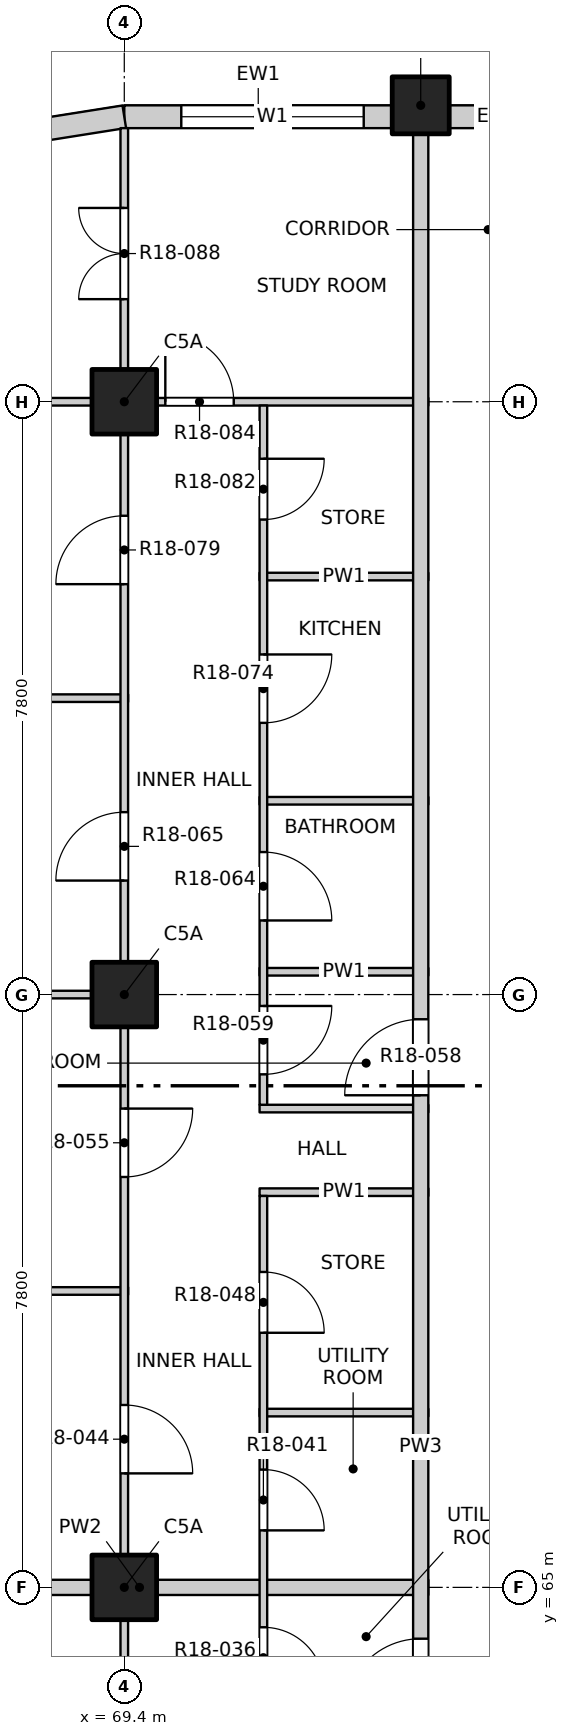
"""IFC4 building model, lengths in metres.
Left out: names, types, materials, properties, quantities, classifications, styles, units other than length and angle.
Written with IfcOpenShell. Run it as: python <this file> out.ifc"""

import sys

from ifc_helpers import new_model, si_unit, direction, frame, frame_2d, origin, origin_2d, place, context, subcontext, project, spatial, rectangle, extrude, element, fill, save


model = new_model("IFC4")
c1 = context("Model", 3, precision=1e-05, world=origin(), true_north=direction((0.0, 1.0)))
c2 = subcontext(c1, "Body", "Model", "MODEL_VIEW")
j1 = project(units=[si_unit("LENGTHUNIT", "METRE"), si_unit("PLANEANGLEUNIT", "RADIAN")], contexts=[c1])
p1 = place(None, origin())
s1 = spatial("IfcSite", under=j1, at=p1, CompositionType="ELEMENT")
p2 = place(p1, origin())
s2 = spatial("IfcBuilding", under=s1, at=p2, CompositionType="ELEMENT")
p3 = place(p2, frame((0.0, 0.0, 189.4)))
s3 = spatial("IfcBuildingStorey", under=s2, at=p3, CompositionType="ELEMENT", Elevation=189.4)
p4 = place(p3, frame((73.3, 84.5, -0.25), z_axis=(0.0, 0.0, 1.0), x_axis=(1.0, 0.0, 0.0)))
e1 = element("IfcColumn", 1, at=p4, inside=s3, PredefinedType="COLUMN", context=c2, shape_type="SweptSolid", body=[
    extrude(rectangle(XDim=0.75, YDim=0.75, at=origin_2d()), origin(), (0.0, 0.0, 1.0), 3.35),
])
for number, where, z_axis, x_axis in (
    (2, (69.4, 65.0, -0.25), (0.0, 0.0, 1.0), (1.0, 0.0, 0.0)),
    (3, (69.4, 72.8, -0.25), (0.0, 0.0, 1.0), (1.0, 0.0, 0.0)),
    (4, (69.4, 80.6, -0.25), (0.0, 0.0, 1.0), (1.0, 0.0, 0.0)),
):
    element("IfcColumn", number, at=place(p3, frame(where, z_axis=z_axis, x_axis=x_axis)), inside=s3, PredefinedType="COLUMN", context=c2, shape_type="SweptSolid", body=[
        extrude(rectangle(XDim=0.85, YDim=0.85, at=origin_2d()), origin(), (0.0, 0.0, 1.0), 3.35),
    ])
p5 = place(p3, frame((69.4, 84.35, 0.0), z_axis=(0.0, 0.0, 1.0), x_axis=(1.0, 0.0, 0.0)))
e5 = element("IfcWall", 5, at=p5, inside=s3, PredefinedType="SOLIDWALL", context=c2, shape_type="SweptSolid", body=[
    extrude(rectangle(XDim=3.525, YDim=0.3, at=frame_2d((1.763, 0.0))), origin(), (0.0, 0.0, 1.0), 3.1),
])
p6 = place(p5, frame((0.75, 0.0, 0.9)))
e6 = element("IfcOpeningElement", 6, at=p6, cuts=e5, PredefinedType="OPENING", context=c2, shape_type="SweptSolid", body=[
    extrude(rectangle(XDim=2.4, YDim=1.8, at=frame_2d((1.2, 0.9))), frame((0.0, 0.16, 0.0), z_axis=(0.0, -1.0, 0.0), x_axis=(1.0, 0.0, 0.0)), (0.0, 0.0, 1.0), 0.32),
])
p7 = place(p3, frame((73.675, 84.35, 0.0), z_axis=(0.0, 0.0, 1.0), x_axis=(1.0, 0.0, 0.0)))
e7 = element("IfcWall", 7, at=p7, inside=s3, PredefinedType="SOLIDWALL", context=c2, shape_type="SweptSolid", body=[
    extrude(rectangle(XDim=1.3, YDim=0.3, at=frame_2d((0.65, 0.0))), origin(), (0.0, 0.0, 1.0), 3.1),
])
p8 = place(p3, frame((69.4, 84.35, 0.0), z_axis=(0.0, 0.0, 1.0), x_axis=(-0.987678452879, -0.156496880861, 0.0)))
e8 = element("IfcWall", 8, at=p8, inside=s3, PredefinedType="SOLIDWALL", context=c2, shape_type="SweptSolid", body=[
    extrude(rectangle(XDim=1.173, YDim=0.3, at=frame_2d((0.586, 0.0))), origin(), (0.0, 0.0, 1.0), 3.1),
])
p9 = place(p3, frame((65.8, 65.0, 0.0), z_axis=(0.0, 0.0, 1.0), x_axis=(1.0, 0.0, 0.0)))
e9 = element("IfcWall", 9, at=p9, inside=s3, PredefinedType="PARTITIONING", context=c2, shape_type="SweptSolid", body=[
    extrude(rectangle(XDim=7.6, YDim=0.2, at=frame_2d((3.8, 0.0))), origin(), (0.0, 0.0, 1.0), 3.1),
])
p10 = place(p3, frame((71.18, 67.3, 0.0), z_axis=(0.0, 0.0, 1.0), x_axis=(1.0, 0.0, 0.0)))
e10 = element("IfcWall", 10, at=p10, inside=s3, PredefinedType="PARTITIONING", context=c2, shape_type="SweptSolid", body=[
    extrude(rectangle(XDim=2.22, YDim=0.1, at=frame_2d((1.11, 0.0))), origin(), (0.0, 0.0, 1.0), 3.1),
])
p11 = place(p3, frame((65.8, 68.9, 0.0), z_axis=(0.0, 0.0, 1.0), x_axis=(1.0, 0.0, 0.0)))
e11 = element("IfcWall", 11, at=p11, inside=s3, PredefinedType="PARTITIONING", context=c2, shape_type="SweptSolid", body=[
    extrude(rectangle(XDim=3.65, YDim=0.1, at=frame_2d((1.825, 0.0))), origin(), (0.0, 0.0, 1.0), 3.1),
])
for number, where, z_axis, x_axis in (
    (12, (71.18, 70.2, 0.0), (0.0, 0.0, 1.0), (1.0, 0.0, 0.0)),
    (13, (71.18, 71.3, 0.0), (0.0, 0.0, 1.0), (1.0, 0.0, 0.0)),
):
    element("IfcWall", number, at=place(p3, frame(where, z_axis=z_axis, x_axis=x_axis)), inside=s3, PredefinedType="PARTITIONING", context=c2, shape_type="SweptSolid", body=[
        extrude(rectangle(XDim=2.22, YDim=0.1, at=frame_2d((1.11, 0.0))), origin(), (0.0, 0.0, 1.0), 3.1),
    ])
p12 = place(p3, frame((65.8, 72.8, 0.0), z_axis=(0.0, 0.0, 1.0), x_axis=(1.0, 0.0, 0.0)))
e14 = element("IfcWall", 14, at=p12, inside=s3, PredefinedType="PARTITIONING", context=c2, shape_type="SweptSolid", body=[
    extrude(rectangle(XDim=3.65, YDim=0.1, at=frame_2d((1.825, 0.0))), origin(), (0.0, 0.0, 1.0), 3.1),
])
for number, where, z_axis, x_axis in (
    (15, (71.18, 73.1, 0.0), (0.0, 0.0, 1.0), (1.0, 0.0, 0.0)),
    (16, (71.18, 75.35, 0.0), (0.0, 0.0, 1.0), (1.0, 0.0, 0.0)),
):
    element("IfcWall", number, at=place(p3, frame(where, z_axis=z_axis, x_axis=x_axis)), inside=s3, PredefinedType="PARTITIONING", context=c2, shape_type="SweptSolid", body=[
        extrude(rectangle(XDim=2.22, YDim=0.1, at=frame_2d((1.11, 0.0))), origin(), (0.0, 0.0, 1.0), 3.1),
    ])
p13 = place(p3, frame((65.8, 76.7, 0.0), z_axis=(0.0, 0.0, 1.0), x_axis=(1.0, 0.0, 0.0)))
e17 = element("IfcWall", 17, at=p13, inside=s3, PredefinedType="PARTITIONING", context=c2, shape_type="SweptSolid", body=[
    extrude(rectangle(XDim=3.65, YDim=0.1, at=frame_2d((1.825, 0.0))), origin(), (0.0, 0.0, 1.0), 3.1),
])
p14 = place(p3, frame((71.18, 78.3, 0.0), z_axis=(0.0, 0.0, 1.0), x_axis=(1.0, 0.0, 0.0)))
e18 = element("IfcWall", 18, at=p14, inside=s3, PredefinedType="PARTITIONING", context=c2, shape_type="SweptSolid", body=[
    extrude(rectangle(XDim=2.22, YDim=0.1, at=frame_2d((1.11, 0.0))), origin(), (0.0, 0.0, 1.0), 3.1),
])
p15 = place(p3, frame((65.8, 80.6, 0.0), z_axis=(0.0, 0.0, 1.0), x_axis=(1.0, 0.0, 0.0)))
e19 = element("IfcWall", 19, at=p15, inside=s3, PredefinedType="PARTITIONING", context=c2, shape_type="SweptSolid", body=[
    extrude(rectangle(XDim=7.6, YDim=0.1, at=frame_2d((3.8, 0.0))), origin(), (0.0, 0.0, 1.0), 3.1),
])
p16 = place(p15, frame((4.14, 0.0, 0.0)))
e20 = element("IfcOpeningElement", 20, at=p16, cuts=e19, PredefinedType="OPENING", context=c2, shape_type="SweptSolid", body=[
    extrude(rectangle(XDim=0.9, YDim=2.1, at=frame_2d((0.45, 1.05))), frame((0.0, 0.06, 0.0), z_axis=(0.0, -1.0, 0.0), x_axis=(1.0, 0.0, 0.0)), (0.0, 0.0, 1.0), 0.12),
])
p17 = place(p3, frame((69.4, 45.8, 0.0), z_axis=(0.0, 0.0, 1.0), x_axis=(0.0, 1.0, 0.0)))
e21 = element("IfcWall", 21, at=p17, inside=s3, PredefinedType="PARTITIONING", context=c2, shape_type="SweptSolid", body=[
    extrude(rectangle(XDim=38.4, YDim=0.1, at=frame_2d((19.2, 0.0))), origin(), (0.0, 0.0, 1.0), 3.1),
])
p18 = place(p17, frame((1.05, 0.0, 0.0)))
e22 = element("IfcOpeningElement", 22, at=p18, cuts=e21, PredefinedType="OPENING", context=c2, shape_type="SweptSolid", body=[
    extrude(rectangle(XDim=1.2, YDim=2.1, at=frame_2d((0.6, 1.05))), frame((0.0, 0.06, 0.0), z_axis=(0.0, -1.0, 0.0), x_axis=(1.0, 0.0, 0.0)), (0.0, 0.0, 1.0), 0.12),
])
p19 = place(p17, frame((5.1, 0.0, 0.0)))
e23 = element("IfcOpeningElement", 23, at=p19, cuts=e21, PredefinedType="OPENING", context=c2, shape_type="SweptSolid", body=[
    extrude(rectangle(XDim=0.9, YDim=2.1, at=frame_2d((0.45, 1.05))), frame((0.0, 0.06, 0.0), z_axis=(0.0, -1.0, 0.0), x_axis=(1.0, 0.0, 0.0)), (0.0, 0.0, 1.0), 0.12),
])
p20 = place(p17, frame((9.0, 0.0, 0.0)))
e24 = element("IfcOpeningElement", 24, at=p20, cuts=e21, PredefinedType="OPENING", context=c2, shape_type="SweptSolid", body=[
    extrude(rectangle(XDim=0.9, YDim=2.1, at=frame_2d((0.45, 1.05))), frame((0.0, 0.06, 0.0), z_axis=(0.0, -1.0, 0.0), x_axis=(1.0, 0.0, 0.0)), (0.0, 0.0, 1.0), 0.12),
])
p21 = place(p17, frame((12.9, 0.0, 0.0)))
e25 = element("IfcOpeningElement", 25, at=p21, cuts=e21, PredefinedType="OPENING", context=c2, shape_type="SweptSolid", body=[
    extrude(rectangle(XDim=0.9, YDim=2.1, at=frame_2d((0.45, 1.05))), frame((0.0, 0.06, 0.0), z_axis=(0.0, -1.0, 0.0), x_axis=(1.0, 0.0, 0.0)), (0.0, 0.0, 1.0), 0.12),
])
p22 = place(p17, frame((16.8, 0.0, 0.0)))
e26 = element("IfcOpeningElement", 26, at=p22, cuts=e21, PredefinedType="OPENING", context=c2, shape_type="SweptSolid", body=[
    extrude(rectangle(XDim=0.9, YDim=2.1, at=frame_2d((0.45, 1.05))), frame((0.0, 0.06, 0.0), z_axis=(0.0, -1.0, 0.0), x_axis=(1.0, 0.0, 0.0)), (0.0, 0.0, 1.0), 0.12),
])
p23 = place(p17, frame((20.7, 0.0, 0.0)))
e27 = element("IfcOpeningElement", 27, at=p23, cuts=e21, PredefinedType="OPENING", context=c2, shape_type="SweptSolid", body=[
    extrude(rectangle(XDim=0.9, YDim=2.1, at=frame_2d((0.45, 1.05))), frame((0.0, 0.06, 0.0), z_axis=(0.0, -1.0, 0.0), x_axis=(1.0, 0.0, 0.0)), (0.0, 0.0, 1.0), 0.12),
])
p24 = place(p17, frame((24.6, 0.0, 0.0)))
e28 = element("IfcOpeningElement", 28, at=p24, cuts=e21, PredefinedType="OPENING", context=c2, shape_type="SweptSolid", body=[
    extrude(rectangle(XDim=0.9, YDim=2.1, at=frame_2d((0.45, 1.05))), frame((0.0, 0.06, 0.0), z_axis=(0.0, -1.0, 0.0), x_axis=(1.0, 0.0, 0.0)), (0.0, 0.0, 1.0), 0.12),
])
p25 = place(p17, frame((28.5, 0.0, 0.0)))
e29 = element("IfcOpeningElement", 29, at=p25, cuts=e21, PredefinedType="OPENING", context=c2, shape_type="SweptSolid", body=[
    extrude(rectangle(XDim=0.9, YDim=2.1, at=frame_2d((0.45, 1.05))), frame((0.0, 0.06, 0.0), z_axis=(0.0, -1.0, 0.0), x_axis=(1.0, 0.0, 0.0)), (0.0, 0.0, 1.0), 0.12),
])
p26 = place(p17, frame((32.4, 0.0, 0.0)))
e30 = element("IfcOpeningElement", 30, at=p26, cuts=e21, PredefinedType="OPENING", context=c2, shape_type="SweptSolid", body=[
    extrude(rectangle(XDim=0.9, YDim=2.1, at=frame_2d((0.45, 1.05))), frame((0.0, 0.06, 0.0), z_axis=(0.0, -1.0, 0.0), x_axis=(1.0, 0.0, 0.0)), (0.0, 0.0, 1.0), 0.12),
])
p27 = place(p17, frame((36.15, 0.0, 0.0)))
e31 = element("IfcOpeningElement", 31, at=p27, cuts=e21, PredefinedType="OPENING", context=c2, shape_type="SweptSolid", body=[
    extrude(rectangle(XDim=1.2, YDim=2.1, at=frame_2d((0.6, 1.05))), frame((0.0, 0.06, 0.0), z_axis=(0.0, -1.0, 0.0), x_axis=(1.0, 0.0, 0.0)), (0.0, 0.0, 1.0), 0.12),
])
p28 = place(p3, frame((71.23, 63.2, 0.0), z_axis=(0.0, 0.0, 1.0), x_axis=(0.0, 1.0, 0.0)))
e32 = element("IfcWall", 32, at=p28, inside=s3, PredefinedType="PARTITIONING", context=c2, shape_type="SweptSolid", body=[
    extrude(rectangle(XDim=6.95, YDim=0.1, at=frame_2d((3.475, 0.0))), origin(), (0.0, 0.0, 1.0), 3.1),
])
p29 = place(p28, frame((0.475, 0.0, 0.0)))
e33 = element("IfcOpeningElement", 33, at=p29, cuts=e32, PredefinedType="OPENING", context=c2, shape_type="SweptSolid", body=[
    extrude(rectangle(XDim=0.8, YDim=2.1, at=frame_2d((0.4, 1.05))), frame((0.0, 0.06, 0.0), z_axis=(0.0, -1.0, 0.0), x_axis=(1.0, 0.0, 0.0)), (0.0, 0.0, 1.0), 0.12),
])
p30 = place(p28, frame((2.55, 0.0, 0.0)))
e34 = element("IfcOpeningElement", 34, at=p30, cuts=e32, PredefinedType="OPENING", context=c2, shape_type="SweptSolid", body=[
    extrude(rectangle(XDim=0.8, YDim=2.1, at=frame_2d((0.4, 1.05))), frame((0.0, 0.06, 0.0), z_axis=(0.0, -1.0, 0.0), x_axis=(1.0, 0.0, 0.0)), (0.0, 0.0, 1.0), 0.12),
])
p31 = place(p28, frame((5.15, 0.0, 0.0)))
e35 = element("IfcOpeningElement", 35, at=p31, cuts=e32, PredefinedType="OPENING", context=c2, shape_type="SweptSolid", body=[
    extrude(rectangle(XDim=0.8, YDim=2.1, at=frame_2d((0.4, 1.05))), frame((0.0, 0.06, 0.0), z_axis=(0.0, -1.0, 0.0), x_axis=(1.0, 0.0, 0.0)), (0.0, 0.0, 1.0), 0.12),
])
p32 = place(p3, frame((71.23, 71.35, 0.0), z_axis=(0.0, 0.0, 1.0), x_axis=(0.0, 1.0, 0.0)))
e36 = element("IfcWall", 36, at=p32, inside=s3, PredefinedType="PARTITIONING", context=c2, shape_type="SweptSolid", body=[
    extrude(rectangle(XDim=9.2, YDim=0.1, at=frame_2d((4.6, 0.0))), origin(), (0.0, 0.0, 1.0), 3.1),
])
p33 = place(p32, frame((0.4, 0.0, 0.0)))
e37 = element("IfcOpeningElement", 37, at=p33, cuts=e36, PredefinedType="OPENING", context=c2, shape_type="SweptSolid", body=[
    extrude(rectangle(XDim=0.9, YDim=2.1, at=frame_2d((0.45, 1.05))), frame((0.0, 0.06, 0.0), z_axis=(0.0, -1.0, 0.0), x_axis=(1.0, 0.0, 0.0)), (0.0, 0.0, 1.0), 0.12),
])
p34 = place(p32, frame((2.425, 0.0, 0.0)))
e38 = element("IfcOpeningElement", 38, at=p34, cuts=e36, PredefinedType="OPENING", context=c2, shape_type="SweptSolid", body=[
    extrude(rectangle(XDim=0.9, YDim=2.1, at=frame_2d((0.45, 1.05))), frame((0.0, 0.06, 0.0), z_axis=(0.0, -1.0, 0.0), x_axis=(1.0, 0.0, 0.0)), (0.0, 0.0, 1.0), 0.12),
])
p35 = place(p32, frame((5.025, 0.0, 0.0)))
e39 = element("IfcOpeningElement", 39, at=p35, cuts=e36, PredefinedType="OPENING", context=c2, shape_type="SweptSolid", body=[
    extrude(rectangle(XDim=0.9, YDim=2.1, at=frame_2d((0.45, 1.05))), frame((0.0, 0.06, 0.0), z_axis=(0.0, -1.0, 0.0), x_axis=(1.0, 0.0, 0.0)), (0.0, 0.0, 1.0), 0.12),
])
p36 = place(p32, frame((7.7, 0.0, 0.0)))
e40 = element("IfcOpeningElement", 40, at=p36, cuts=e36, PredefinedType="OPENING", context=c2, shape_type="SweptSolid", body=[
    extrude(rectangle(XDim=0.8, YDim=2.1, at=frame_2d((0.4, 1.05))), frame((0.0, 0.06, 0.0), z_axis=(0.0, -1.0, 0.0), x_axis=(1.0, 0.0, 0.0)), (0.0, 0.0, 1.0), 0.12),
])
p37 = place(p3, frame((73.3, 49.5, 0.0), z_axis=(0.0, 0.0, 1.0), x_axis=(0.0, 1.0, 0.0)))
e41 = element("IfcWall", 41, at=p37, inside=s3, PredefinedType="PARTITIONING", context=c2, shape_type="SweptSolid", body=[
    extrude(rectangle(XDim=34.7, YDim=0.2, at=frame_2d((17.35, 0.0))), origin(), (0.0, 0.0, 1.0), 3.1),
])
p38 = place(p37, frame((13.825, 0.0, 0.0)))
e42 = element("IfcOpeningElement", 42, at=p38, cuts=e41, PredefinedType="OPENING", context=c2, shape_type="SweptSolid", body=[
    extrude(rectangle(XDim=1.0, YDim=2.1, at=frame_2d((0.5, 1.05))), frame((0.0, 0.11, 0.0), z_axis=(0.0, -1.0, 0.0), x_axis=(1.0, 0.0, 0.0)), (0.0, 0.0, 1.0), 0.22),
])
p39 = place(p37, frame((21.975, 0.0, 0.0)))
e43 = element("IfcOpeningElement", 43, at=p39, cuts=e41, PredefinedType="OPENING", context=c2, shape_type="SweptSolid", body=[
    extrude(rectangle(XDim=1.0, YDim=2.1, at=frame_2d((0.5, 1.05))), frame((0.0, 0.11, 0.0), z_axis=(0.0, -1.0, 0.0), x_axis=(1.0, 0.0, 0.0)), (0.0, 0.0, 1.0), 0.22),
])
p40 = place(p6, origin())
e44 = element("IfcWindow", 44, at=p40, inside=s3, PartitioningType="DOUBLE_PANEL_VERTICAL", PredefinedType="WINDOW", context=c2, shape_type="SweptSolid", body=[
    extrude(rectangle(XDim=2.4, YDim=1.8, at=frame_2d((1.2, 0.9))), frame((0.0, 0.03, 0.0), z_axis=(0.0, -1.0, 0.0), x_axis=(1.0, 0.0, 0.0)), (0.0, 0.0, 1.0), 0.06),
])
fill(e6, e44)
p41 = place(p38, origin())
e45 = element("IfcDoor", 45, at=p41, inside=s3, OperationType="SINGLE_SWING_RIGHT", PredefinedType="DOOR", context=c2, shape_type="SweptSolid", body=[
    extrude(rectangle(XDim=1.0, YDim=2.1, at=frame_2d((0.5, 1.05))), frame((0.0, 0.025, 0.0), z_axis=(0.0, -1.0, 0.0), x_axis=(1.0, 0.0, 0.0)), (0.0, 0.0, 1.0), 0.05),
])
fill(e42, e45)
p42 = place(p29, origin())
e46 = element("IfcDoor", 46, at=p42, inside=s3, OperationType="SINGLE_SWING_RIGHT", PredefinedType="DOOR", context=c2, shape_type="SweptSolid", body=[
    extrude(rectangle(XDim=0.8, YDim=2.1, at=frame_2d((0.4, 1.05))), frame((0.0, 0.025, 0.0), z_axis=(0.0, -1.0, 0.0), x_axis=(1.0, 0.0, 0.0)), (0.0, 0.0, 1.0), 0.05),
])
fill(e33, e46)
p43 = place(p30, origin())
e47 = element("IfcDoor", 47, at=p43, inside=s3, OperationType="SINGLE_SWING_RIGHT", PredefinedType="DOOR", context=c2, shape_type="SweptSolid", body=[
    extrude(rectangle(XDim=0.8, YDim=2.1, at=frame_2d((0.4, 1.05))), frame((0.0, 0.025, 0.0), z_axis=(0.0, -1.0, 0.0), x_axis=(1.0, 0.0, 0.0)), (0.0, 0.0, 1.0), 0.05),
])
fill(e34, e47)
p44 = place(p23, origin())
e48 = element("IfcDoor", 48, at=p44, inside=s3, OperationType="SINGLE_SWING_RIGHT", PredefinedType="DOOR", context=c2, shape_type="SweptSolid", body=[
    extrude(rectangle(XDim=0.9, YDim=2.1, at=frame_2d((0.45, 1.05))), frame((0.0, 0.025, 0.0), z_axis=(0.0, -1.0, 0.0), x_axis=(1.0, 0.0, 0.0)), (0.0, 0.0, 1.0), 0.05),
])
fill(e27, e48)
p45 = place(p31, origin())
e49 = element("IfcDoor", 49, at=p45, inside=s3, OperationType="SINGLE_SWING_RIGHT", PredefinedType="DOOR", context=c2, shape_type="SweptSolid", body=[
    extrude(rectangle(XDim=0.8, YDim=2.1, at=frame_2d((0.4, 1.05))), frame((0.0, 0.025, 0.0), z_axis=(0.0, -1.0, 0.0), x_axis=(1.0, 0.0, 0.0)), (0.0, 0.0, 1.0), 0.05),
])
fill(e35, e49)
p46 = place(p24, origin())
e50 = element("IfcDoor", 50, at=p46, inside=s3, OperationType="SINGLE_SWING_LEFT", PredefinedType="DOOR", context=c2, shape_type="SweptSolid", body=[
    extrude(rectangle(XDim=0.9, YDim=2.1, at=frame_2d((0.45, 1.05))), frame((0.0, 0.025, 0.0), z_axis=(0.0, -1.0, 0.0), x_axis=(1.0, 0.0, 0.0)), (0.0, 0.0, 1.0), 0.05),
])
fill(e28, e50)
p47 = place(p39, origin())
e51 = element("IfcDoor", 51, at=p47, inside=s3, OperationType="SINGLE_SWING_RIGHT", PredefinedType="DOOR", context=c2, shape_type="SweptSolid", body=[
    extrude(rectangle(XDim=1.0, YDim=2.1, at=frame_2d((0.5, 1.05))), frame((0.0, 0.025, 0.0), z_axis=(0.0, -1.0, 0.0), x_axis=(1.0, 0.0, 0.0)), (0.0, 0.0, 1.0), 0.05),
])
fill(e43, e51)
p48 = place(p33, origin())
e52 = element("IfcDoor", 52, at=p48, inside=s3, OperationType="SINGLE_SWING_LEFT", PredefinedType="DOOR", context=c2, shape_type="SweptSolid", body=[
    extrude(rectangle(XDim=0.9, YDim=2.1, at=frame_2d((0.45, 1.05))), frame((0.0, 0.025, 0.0), z_axis=(0.0, -1.0, 0.0), x_axis=(1.0, 0.0, 0.0)), (0.0, 0.0, 1.0), 0.05),
])
fill(e37, e52)
p49 = place(p34, origin())
e53 = element("IfcDoor", 53, at=p49, inside=s3, OperationType="SINGLE_SWING_RIGHT", PredefinedType="DOOR", context=c2, shape_type="SweptSolid", body=[
    extrude(rectangle(XDim=0.9, YDim=2.1, at=frame_2d((0.45, 1.05))), frame((0.0, 0.025, 0.0), z_axis=(0.0, -1.0, 0.0), x_axis=(1.0, 0.0, 0.0)), (0.0, 0.0, 1.0), 0.05),
])
fill(e38, e53)
p50 = place(p25, origin())
e54 = element("IfcDoor", 54, at=p50, inside=s3, OperationType="SINGLE_SWING_LEFT", PredefinedType="DOOR", context=c2, shape_type="SweptSolid", body=[
    extrude(rectangle(XDim=0.9, YDim=2.1, at=frame_2d((0.45, 1.05))), frame((0.0, 0.025, 0.0), z_axis=(0.0, -1.0, 0.0), x_axis=(1.0, 0.0, 0.0)), (0.0, 0.0, 1.0), 0.05),
])
fill(e29, e54)
p51 = place(p35, origin())
e55 = element("IfcDoor", 55, at=p51, inside=s3, OperationType="SINGLE_SWING_LEFT", PredefinedType="DOOR", context=c2, shape_type="SweptSolid", body=[
    extrude(rectangle(XDim=0.9, YDim=2.1, at=frame_2d((0.45, 1.05))), frame((0.0, 0.025, 0.0), z_axis=(0.0, -1.0, 0.0), x_axis=(1.0, 0.0, 0.0)), (0.0, 0.0, 1.0), 0.05),
])
fill(e39, e55)
p52 = place(p26, origin())
e56 = element("IfcDoor", 56, at=p52, inside=s3, OperationType="SINGLE_SWING_LEFT", PredefinedType="DOOR", context=c2, shape_type="SweptSolid", body=[
    extrude(rectangle(XDim=0.9, YDim=2.1, at=frame_2d((0.45, 1.05))), frame((0.0, 0.025, 0.0), z_axis=(0.0, -1.0, 0.0), x_axis=(1.0, 0.0, 0.0)), (0.0, 0.0, 1.0), 0.05),
])
fill(e30, e56)
p53 = place(p36, origin())
e57 = element("IfcDoor", 57, at=p53, inside=s3, OperationType="SINGLE_SWING_LEFT", PredefinedType="DOOR", context=c2, shape_type="SweptSolid", body=[
    extrude(rectangle(XDim=0.8, YDim=2.1, at=frame_2d((0.4, 1.05))), frame((0.0, 0.025, 0.0), z_axis=(0.0, -1.0, 0.0), x_axis=(1.0, 0.0, 0.0)), (0.0, 0.0, 1.0), 0.05),
])
fill(e40, e57)
p54 = place(p16, origin())
e58 = element("IfcDoor", 58, at=p54, inside=s3, OperationType="SINGLE_SWING_LEFT", PredefinedType="DOOR", context=c2, shape_type="SweptSolid", body=[
    extrude(rectangle(XDim=0.9, YDim=2.1, at=frame_2d((0.45, 1.05))), frame((0.0, 0.025, 0.0), z_axis=(0.0, -1.0, 0.0), x_axis=(1.0, 0.0, 0.0)), (0.0, 0.0, 1.0), 0.05),
])
fill(e20, e58)
p55 = place(p27, origin())
e59 = element("IfcDoor", 59, at=p55, inside=s3, OperationType="DOUBLE_DOOR_SINGLE_SWING", PredefinedType="DOOR", context=c2, shape_type="SweptSolid", body=[
    extrude(rectangle(XDim=1.2, YDim=2.1, at=frame_2d((0.6, 1.05))), frame((0.0, 0.025, 0.0), z_axis=(0.0, -1.0, 0.0), x_axis=(1.0, 0.0, 0.0)), (0.0, 0.0, 1.0), 0.05),
])
fill(e31, e59)
save(model, sys.argv[1])
